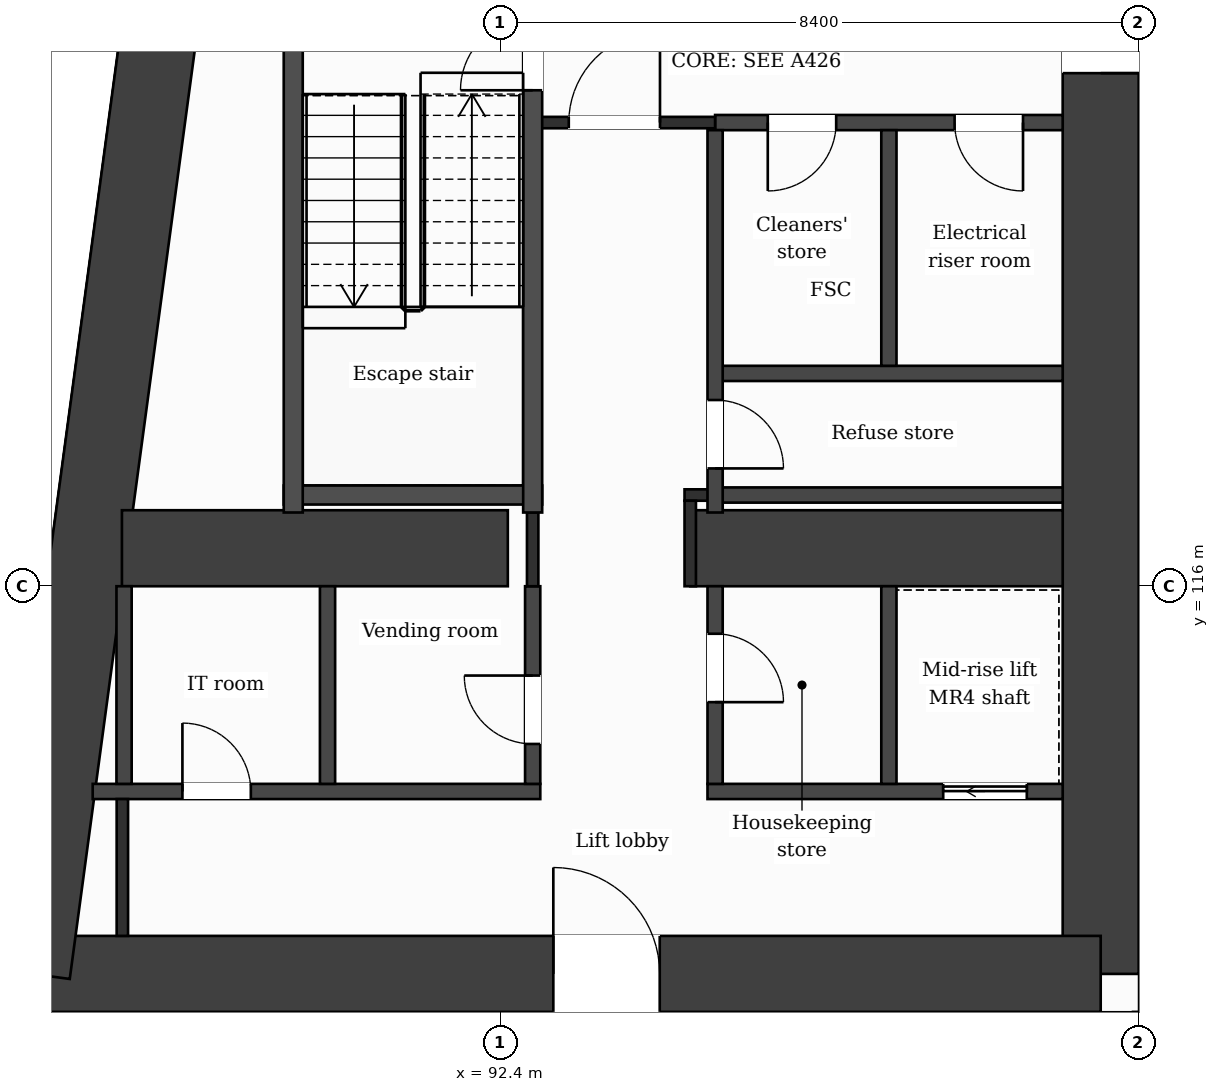
"""IFC4 building model, lengths in metres.
Left out: names, types, materials, properties, quantities, classifications, styles, units other than length and angle.
Written with IfcOpenShell. Run it as: python <this file> out.ifc"""

import sys

from ifc_helpers import new_model, si_unit, direction, frame, frame_2d, origin, place, context, subcontext, project, spatial, rectangle, extrude, element, fill, save


model = new_model("IFC4")
c1 = context("Model", 3, precision=1e-05, world=origin(), true_north=direction((0.0, 1.0)))
c2 = subcontext(c1, "Body", "Model", "MODEL_VIEW")
j1 = project(units=[si_unit("LENGTHUNIT", "METRE"), si_unit("PLANEANGLEUNIT", "RADIAN")], contexts=[c1])
p1 = place(None, origin())
s1 = spatial("IfcSite", under=j1, at=p1, CompositionType="ELEMENT")
p2 = place(p1, origin())
s2 = spatial("IfcBuilding", under=s1, at=p2, CompositionType="ELEMENT")
p3 = place(p2, frame((0.0, 0.0, 109.5)))
s3 = spatial("IfcBuildingStorey", under=s2, at=p3, CompositionType="ELEMENT", Elevation=109.5)
p4 = place(p3, frame((100.3, 131.9, 0.0), z_axis=(0.0, 0.0, 1.0), x_axis=(0.0, -1.0, 0.0)))
e1 = element("IfcWall", 1, at=p4, inside=s3, PredefinedType="SHEAR", context=c2, shape_type="SweptSolid", body=[
    extrude(rectangle(XDim=21.0, YDim=1.0, at=frame_2d((10.5, 0.0))), origin(), (0.0, 0.0, 1.0), 3.7),
])
p5 = place(p4, frame((7.75, 0.0, 0.0)))
e2 = element("IfcOpeningElement", 2, at=p5, cuts=e1, PredefinedType="OPENING", context=c2, shape_type="SweptSolid", body=[
    extrude(rectangle(XDim=1.4, YDim=2.1, at=frame_2d((0.7, 1.05))), frame((0.0, 0.51, 0.0), z_axis=(0.0, -1.0, 0.0), x_axis=(1.0, 0.0, 0.0)), (0.0, 0.0, 1.0), 1.02),
])
p6 = place(p3, frame((100.3, 110.9, 0.0), z_axis=(0.0, 0.0, 1.0), x_axis=(-1.0, 0.0, 0.0)))
e3 = element("IfcWall", 3, at=p6, inside=s3, PredefinedType="SHEAR", context=c2, shape_type="SweptSolid", body=[
    extrude(rectangle(XDim=14.059, YDim=1.0, at=frame_2d((7.03, 0.0))), origin(), (0.0, 0.0, 1.0), 3.7),
])
p7 = place(p6, frame((5.802, 0.0, 0.0)))
e4 = element("IfcOpeningElement", 4, at=p7, cuts=e3, PredefinedType="OPENING", context=c2, shape_type="SweptSolid", body=[
    extrude(rectangle(XDim=1.4, YDim=2.1, at=frame_2d((0.7, 1.05))), frame((0.0, 0.51, 0.0), z_axis=(0.0, -1.0, 0.0), x_axis=(1.0, 0.0, 0.0)), (0.0, 0.0, 1.0), 1.02),
])
p8 = place(p3, frame((86.241, 110.9, 0.0), z_axis=(0.0, 0.0, 1.0), x_axis=(0.133411141623, 0.991060778808, 0.0)))
e5 = element("IfcWall", 5, at=p8, inside=s3, PredefinedType="SHEAR", context=c2, shape_type="SweptSolid", body=[
    extrude(rectangle(XDim=21.189, YDim=1.0, at=frame_2d((10.595, 0.0))), origin(), (0.0, 0.0, 1.0), 3.7),
])
p9 = place(p3, frame((87.423, 116.5, 0.0), z_axis=(0.0, 0.0, 1.0), x_axis=(1.0, 0.0, 0.0)))
e6 = element("IfcWall", 6, at=p9, inside=s3, PredefinedType="SHEAR", context=c2, shape_type="SweptSolid", body=[
    extrude(rectangle(XDim=5.077, YDim=1.0, at=frame_2d((2.539, 0.0))), origin(), (0.0, 0.0, 1.0), 3.7),
])
p10 = place(p3, frame((94.9, 116.5, 0.0), z_axis=(0.0, 0.0, 1.0), x_axis=(1.0, 0.0, 0.0)))
e7 = element("IfcWall", 7, at=p10, inside=s3, PredefinedType="SHEAR", context=c2, shape_type="SweptSolid", body=[
    extrude(rectangle(XDim=4.9, YDim=1.0, at=frame_2d((2.45, 0.0))), origin(), (0.0, 0.0, 1.0), 3.7),
])
p11 = place(p3, frame((87.334, 110.4, 0.0), z_axis=(0.0, 0.0, 1.0), x_axis=(-0.133437175554, -0.991057273915, 0.0)))
e8 = element("IfcWall", 8, at=p11, inside=s3, PredefinedType="SOLIDWALL", context=c2, shape_type="SweptSolid", body=[
    extrude(rectangle(XDim=6.781, YDim=0.3, at=frame_2d((3.39, 0.0))), origin(), (0.0, 0.0, 1.0), 3.38),
])
p12 = place(p11, frame((1.418, 0.0, 0.0)))
e9 = element("IfcOpeningElement", 9, at=p12, cuts=e8, PredefinedType="OPENING", context=c2, shape_type="SweptSolid", body=[
    extrude(rectangle(XDim=1.2, YDim=2.4, at=frame_2d((0.6, 1.2))), frame((0.0, 0.16, 0.0), z_axis=(0.0, -1.0, 0.0), x_axis=(1.0, 0.0, 0.0)), (0.0, 0.0, 1.0), 0.32),
])
p13 = place(p11, frame((4.758, 0.0, 0.9)))
e10 = element("IfcOpeningElement", 10, at=p13, cuts=e8, PredefinedType="OPENING", context=c2, shape_type="SweptSolid", body=[
    extrude(rectangle(XDim=1.2, YDim=2.1, at=frame_2d((0.6, 1.05))), frame((0.0, 0.16, 0.0), z_axis=(0.0, -1.0, 0.0), x_axis=(1.0, 0.0, 0.0)), (0.0, 0.0, 1.0), 0.32),
])
p14 = place(p3, frame((87.039, 113.3, 0.0), z_axis=(0.0, 0.0, 1.0), x_axis=(1.0, 0.0, 0.0)))
e11 = element("IfcWall", 11, at=p14, inside=s3, PredefinedType="PARTITIONING", context=c2, shape_type="SweptSolid", body=[
    extrude(rectangle(XDim=5.888, YDim=0.2, at=frame_2d((2.944, 0.0))), origin(), (0.0, 0.0, 1.0), 3.38),
])
p15 = place(p14, frame((1.18, 0.0, 0.0)))
e12 = element("IfcOpeningElement", 12, at=p15, cuts=e11, PredefinedType="OPENING", context=c2, shape_type="SweptSolid", body=[
    extrude(rectangle(XDim=0.9, YDim=2.1, at=frame_2d((0.45, 1.05))), frame((0.0, 0.11, 0.0), z_axis=(0.0, -1.0, 0.0), x_axis=(1.0, 0.0, 0.0)), (0.0, 0.0, 1.0), 0.22),
])
p16 = place(p3, frame((95.127, 113.3, 0.0), z_axis=(0.0, 0.0, 1.0), x_axis=(1.0, 0.0, 0.0)))
e13 = element("IfcWall", 13, at=p16, inside=s3, PredefinedType="PARTITIONING", context=c2, shape_type="SweptSolid", body=[
    extrude(rectangle(XDim=4.673, YDim=0.2, at=frame_2d((2.336, 0.0))), origin(), (0.0, 0.0, 1.0), 3.38),
])
p17 = place(p16, frame((3.101, 0.0, 0.0)))
e14 = element("IfcOpeningElement", 14, at=p17, cuts=e13, PredefinedType="OPENING", context=c2, shape_type="SweptSolid", body=[
    extrude(rectangle(XDim=1.1, YDim=2.1, at=frame_2d((0.55, 1.05))), frame((0.0, 0.11, 0.0), z_axis=(0.0, -1.0, 0.0), x_axis=(1.0, 0.0, 0.0)), (0.0, 0.0, 1.0), 0.22),
])
p18 = place(p3, frame((95.227, 117.2, 0.0), z_axis=(0.0, 0.0, 1.0), x_axis=(1.0, 0.0, 0.0)))
e15 = element("IfcWall", 15, at=p18, inside=s3, PredefinedType="PARTITIONING", context=c2, shape_type="SweptSolid", body=[
    extrude(rectangle(XDim=4.573, YDim=0.2, at=frame_2d((2.287, 0.0))), origin(), (0.0, 0.0, 1.0), 3.38),
])
p19 = place(p3, frame((94.825, 117.2, 0.0), z_axis=(0.0, 0.0, 1.0), x_axis=(1.0, 0.0, 0.0)))
e16 = element("IfcWall", 16, at=p19, inside=s3, PredefinedType="PARTITIONING", context=c2, shape_type="SweptSolid", body=[
    extrude(rectangle(XDim=0.402, YDim=0.15, at=frame_2d((0.201, 0.0))), origin(), (0.0, 0.0, 1.0), 3.38),
])
p20 = place(p3, frame((89.552, 117.2, 0.0), z_axis=(0.0, 0.0, 1.0), x_axis=(1.0, 0.0, 0.0)))
e17 = element("IfcWall", 17, at=p20, inside=s3, PredefinedType="PARTITIONING", context=c2, shape_type="SweptSolid", body=[
    extrude(rectangle(XDim=3.4, YDim=0.25, at=frame_2d((1.7, 0.0))), origin(), (0.0, 0.0, 1.0), 3.38),
])
p21 = place(p3, frame((95.227, 118.8, 0.0), z_axis=(0.0, 0.0, 1.0), x_axis=(1.0, 0.0, 0.0)))
e18 = element("IfcWall", 18, at=p21, inside=s3, PredefinedType="PARTITIONING", context=c2, shape_type="SweptSolid", body=[
    extrude(rectangle(XDim=4.573, YDim=0.2, at=frame_2d((2.287, 0.0))), origin(), (0.0, 0.0, 1.0), 3.38),
])
p22 = place(p3, frame((95.227, 122.1, 0.0), z_axis=(0.0, 0.0, 1.0), x_axis=(1.0, 0.0, 0.0)))
e19 = element("IfcWall", 19, at=p22, inside=s3, PredefinedType="PARTITIONING", context=c2, shape_type="SweptSolid", body=[
    extrude(rectangle(XDim=4.573, YDim=0.2, at=frame_2d((2.287, 0.0))), origin(), (0.0, 0.0, 1.0), 3.38),
])
p23 = place(p22, frame((0.693, 0.0, 0.0)))
e20 = element("IfcOpeningElement", 20, at=p23, cuts=e19, PredefinedType="OPENING", context=c2, shape_type="SweptSolid", body=[
    extrude(rectangle(XDim=0.9, YDim=2.1, at=frame_2d((0.45, 1.05))), frame((0.0, 0.11, 0.0), z_axis=(0.0, -1.0, 0.0), x_axis=(1.0, 0.0, 0.0)), (0.0, 0.0, 1.0), 0.22),
])
p24 = place(p22, frame((3.151, 0.0, 0.0)))
e21 = element("IfcOpeningElement", 21, at=p24, cuts=e19, PredefinedType="OPENING", context=c2, shape_type="SweptSolid", body=[
    extrude(rectangle(XDim=0.9, YDim=2.1, at=frame_2d((0.45, 1.05))), frame((0.0, 0.11, 0.0), z_axis=(0.0, -1.0, 0.0), x_axis=(1.0, 0.0, 0.0)), (0.0, 0.0, 1.0), 0.22),
])
p25 = place(p3, frame((92.827, 122.1, 0.0), z_axis=(0.0, 0.0, 1.0), x_axis=(1.0, 0.0, 0.0)))
e22 = element("IfcWall", 22, at=p25, inside=s3, PredefinedType="PARTITIONING", context=c2, shape_type="SweptSolid", body=[
    extrude(rectangle(XDim=2.4, YDim=0.15, at=frame_2d((1.2, 0.0))), origin(), (0.0, 0.0, 1.0), 3.38),
])
p26 = place(p25, frame((0.475, 0.0, 0.0)))
e23 = element("IfcOpeningElement", 23, at=p26, cuts=e22, PredefinedType="OPENING", context=c2, shape_type="SweptSolid", body=[
    extrude(rectangle(XDim=1.2, YDim=2.1, at=frame_2d((0.6, 1.05))), frame((0.0, 0.085, 0.0), z_axis=(0.0, -1.0, 0.0), x_axis=(1.0, 0.0, 0.0)), (0.0, 0.0, 1.0), 0.17),
])
p27 = place(p3, frame((87.451, 113.4, 0.0), z_axis=(0.0, 0.0, 1.0), x_axis=(0.0, 1.0, 0.0)))
e24 = element("IfcWall", 24, at=p27, inside=s3, PredefinedType="PARTITIONING", context=c2, shape_type="SweptSolid", body=[
    extrude(rectangle(XDim=2.6, YDim=0.2, at=frame_2d((1.3, 0.0))), origin(), (0.0, 0.0, 1.0), 3.38),
])
p28 = place(p3, frame((87.429, 111.4, 0.0), z_axis=(0.0, 0.0, 1.0), x_axis=(0.0, 1.0, 0.0)))
e25 = element("IfcWall", 25, at=p28, inside=s3, PredefinedType="PARTITIONING", context=c2, shape_type="SweptSolid", body=[
    extrude(rectangle(XDim=1.8, YDim=0.15, at=frame_2d((0.9, 0.0))), origin(), (0.0, 0.0, 1.0), 3.38),
])
p29 = place(p3, frame((89.677, 116.97, 0.0), z_axis=(0.0, 0.0, 1.0), x_axis=(0.0, 1.0, 0.0)))
e26 = element("IfcWall", 26, at=p29, inside=s3, PredefinedType="PARTITIONING", context=c2, shape_type="SweptSolid", body=[
    extrude(rectangle(XDim=6.855, YDim=0.25, at=frame_2d((3.427, 0.0))), origin(), (0.0, 0.0, 1.0), 3.38),
])
p30 = place(p3, frame((90.128, 113.4, 0.0), z_axis=(0.0, 0.0, 1.0), x_axis=(0.0, 1.0, 0.0)))
e27 = element("IfcWall", 27, at=p30, inside=s3, PredefinedType="PARTITIONING", context=c2, shape_type="SweptSolid", body=[
    extrude(rectangle(XDim=2.6, YDim=0.2, at=frame_2d((1.3, 0.0))), origin(), (0.0, 0.0, 1.0), 3.38),
])
p31 = place(p3, frame((92.827, 113.4, 0.0), z_axis=(0.0, 0.0, 1.0), x_axis=(0.0, 1.0, 0.0)))
e28 = element("IfcWall", 28, at=p31, inside=s3, PredefinedType="PARTITIONING", context=c2, shape_type="SweptSolid", body=[
    extrude(rectangle(XDim=2.6, YDim=0.2, at=frame_2d((1.3, 0.0))), origin(), (0.0, 0.0, 1.0), 3.38),
])
p32 = place(p31, frame((0.525, 0.0, 0.0)))
e29 = element("IfcOpeningElement", 29, at=p32, cuts=e28, PredefinedType="OPENING", context=c2, shape_type="SweptSolid", body=[
    extrude(rectangle(XDim=0.9, YDim=2.1, at=frame_2d((0.45, 1.05))), frame((0.0, 0.11, 0.0), z_axis=(0.0, -1.0, 0.0), x_axis=(1.0, 0.0, 0.0)), (0.0, 0.0, 1.0), 0.22),
])
p33 = place(p3, frame((92.827, 116.0, 0.0), z_axis=(0.0, 0.0, 1.0), x_axis=(0.0, 1.0, 0.0)))
e30 = element("IfcWall", 30, at=p33, inside=s3, PredefinedType="PARTITIONING", context=c2, shape_type="SweptSolid", body=[
    extrude(rectangle(XDim=0.97, YDim=0.15, at=frame_2d((0.485, 0.0))), origin(), (0.0, 0.0, 1.0), 3.38),
])
p34 = place(p3, frame((92.827, 116.97, 0.0), z_axis=(0.0, 0.0, 1.0), x_axis=(0.0, 1.0, 0.0)))
e31 = element("IfcWall", 31, at=p34, inside=s3, PredefinedType="PARTITIONING", context=c2, shape_type="SweptSolid", body=[
    extrude(rectangle(XDim=6.855, YDim=0.25, at=frame_2d((3.427, 0.0))), origin(), (0.0, 0.0, 1.0), 3.38),
])
p35 = place(p34, frame((5.555, 0.0, 0.0)))
e32 = element("IfcOpeningElement", 32, at=p35, cuts=e31, PredefinedType="OPENING", context=c2, shape_type="SweptSolid", body=[
    extrude(rectangle(XDim=0.95, YDim=2.1, at=frame_2d((0.475, 1.05))), frame((0.0, 0.135, 0.0), z_axis=(0.0, -1.0, 0.0), x_axis=(1.0, 0.0, 0.0)), (0.0, 0.0, 1.0), 0.27),
])
p36 = place(p3, frame((94.9, 116.0, 0.0), z_axis=(0.0, 0.0, 1.0), x_axis=(0.0, 1.0, 0.0)))
e33 = element("IfcWall", 33, at=p36, inside=s3, PredefinedType="PARTITIONING", context=c2, shape_type="SweptSolid", body=[
    extrude(rectangle(XDim=1.125, YDim=0.15, at=frame_2d((0.562, 0.0))), origin(), (0.0, 0.0, 1.0), 3.38),
])
p37 = place(p3, frame((95.227, 113.4, 0.0), z_axis=(0.0, 0.0, 1.0), x_axis=(0.0, 1.0, 0.0)))
e34 = element("IfcWall", 34, at=p37, inside=s3, PredefinedType="PARTITIONING", context=c2, shape_type="SweptSolid", body=[
    extrude(rectangle(XDim=2.6, YDim=0.2, at=frame_2d((1.3, 0.0))), origin(), (0.0, 0.0, 1.0), 3.38),
])
p38 = place(p37, frame((1.075, 0.0, 0.0)))
e35 = element("IfcOpeningElement", 35, at=p38, cuts=e34, PredefinedType="OPENING", context=c2, shape_type="SweptSolid", body=[
    extrude(rectangle(XDim=0.9, YDim=2.1, at=frame_2d((0.45, 1.05))), frame((0.0, 0.11, 0.0), z_axis=(0.0, -1.0, 0.0), x_axis=(1.0, 0.0, 0.0)), (0.0, 0.0, 1.0), 0.22),
])
p39 = place(p3, frame((95.227, 116.97, 0.0), z_axis=(0.0, 0.0, 1.0), x_axis=(0.0, 1.0, 0.0)))
e36 = element("IfcWall", 36, at=p39, inside=s3, PredefinedType="PARTITIONING", context=c2, shape_type="SweptSolid", body=[
    extrude(rectangle(XDim=5.03, YDim=0.2, at=frame_2d((2.515, 0.0))), origin(), (0.0, 0.0, 1.0), 3.38),
])
p40 = place(p39, frame((0.58, 0.0, 0.0)))
e37 = element("IfcOpeningElement", 37, at=p40, cuts=e36, PredefinedType="OPENING", context=c2, shape_type="SweptSolid", body=[
    extrude(rectangle(XDim=0.9, YDim=2.1, at=frame_2d((0.45, 1.05))), frame((0.0, 0.11, 0.0), z_axis=(0.0, -1.0, 0.0), x_axis=(1.0, 0.0, 0.0)), (0.0, 0.0, 1.0), 0.22),
])
p41 = place(p3, frame((97.513, 113.4, 0.0), z_axis=(0.0, 0.0, 1.0), x_axis=(0.0, 1.0, 0.0)))
e38 = element("IfcWall", 38, at=p41, inside=s3, PredefinedType="PARTITIONING", context=c2, shape_type="SweptSolid", body=[
    extrude(rectangle(XDim=2.6, YDim=0.2, at=frame_2d((1.3, 0.0))), origin(), (0.0, 0.0, 1.0), 3.38),
])
p42 = place(p3, frame((97.513, 118.9, 0.0), z_axis=(0.0, 0.0, 1.0), x_axis=(0.0, 1.0, 0.0)))
e39 = element("IfcWall", 39, at=p42, inside=s3, PredefinedType="PARTITIONING", context=c2, shape_type="SweptSolid", body=[
    extrude(rectangle(XDim=3.1, YDim=0.2, at=frame_2d((1.55, 0.0))), origin(), (0.0, 0.0, 1.0), 3.38),
])
p43 = place(p3, frame((100.8, 109.075, 0.0), z_axis=(0.0, 0.0, 1.0), x_axis=(0.0, 1.0, 0.0)))
e40 = element("IfcWall", 40, at=p43, inside=s3, PredefinedType="PARTITIONING", context=c2, shape_type="SweptSolid", body=[
    extrude(rectangle(XDim=1.325, YDim=0.15, at=frame_2d((0.663, 0.0))), origin(), (0.0, 0.0, 1.0), 3.38),
])
p44 = place(p26, origin())
e41 = element("IfcDoor", 41, at=p44, inside=s3, OperationType="SINGLE_SWING_RIGHT", PredefinedType="DOOR", context=c2, shape_type="SweptSolid", body=[
    extrude(rectangle(XDim=1.2, YDim=2.1, at=frame_2d((0.6, 1.05))), frame((0.0, 0.025, 0.0), z_axis=(0.0, -1.0, 0.0), x_axis=(1.0, 0.0, 0.0)), (0.0, 0.0, 1.0), 0.05),
])
fill(e23, e41)
p45 = place(p23, origin())
e42 = element("IfcDoor", 42, at=p45, inside=s3, OperationType="SINGLE_SWING_LEFT", PredefinedType="DOOR", context=c2, shape_type="SweptSolid", body=[
    extrude(rectangle(XDim=0.9, YDim=2.1, at=frame_2d((0.45, 1.05))), frame((0.0, 0.025, 0.0), z_axis=(0.0, -1.0, 0.0), x_axis=(1.0, 0.0, 0.0)), (0.0, 0.0, 1.0), 0.05),
])
fill(e20, e42)
p46 = place(p24, origin())
e43 = element("IfcDoor", 43, at=p46, inside=s3, OperationType="SINGLE_SWING_RIGHT", PredefinedType="DOOR", context=c2, shape_type="SweptSolid", body=[
    extrude(rectangle(XDim=0.9, YDim=2.1, at=frame_2d((0.45, 1.05))), frame((0.0, 0.025, 0.0), z_axis=(0.0, -1.0, 0.0), x_axis=(1.0, 0.0, 0.0)), (0.0, 0.0, 1.0), 0.05),
])
fill(e21, e43)
p47 = place(p35, origin())
e44 = element("IfcDoor", 44, at=p47, inside=s3, OperationType="SINGLE_SWING_LEFT", PredefinedType="DOOR", context=c2, shape_type="SweptSolid", body=[
    extrude(rectangle(XDim=0.95, YDim=2.1, at=frame_2d((0.475, 1.05))), frame((0.0, 0.025, 0.0), z_axis=(0.0, -1.0, 0.0), x_axis=(1.0, 0.0, 0.0)), (0.0, 0.0, 1.0), 0.05),
])
fill(e32, e44)
p48 = place(p40, origin())
e45 = element("IfcDoor", 45, at=p48, inside=s3, OperationType="SINGLE_SWING_LEFT", PredefinedType="DOOR", context=c2, shape_type="SweptSolid", body=[
    extrude(rectangle(XDim=0.9, YDim=2.1, at=frame_2d((0.45, 1.05))), frame((0.0, 0.025, 0.0), z_axis=(0.0, -1.0, 0.0), x_axis=(1.0, 0.0, 0.0)), (0.0, 0.0, 1.0), 0.05),
])
fill(e37, e45)
p49 = place(p17, origin())
e46 = element("IfcDoor", 46, at=p49, inside=s3, OperationType="SLIDING_TO_LEFT", PredefinedType="DOOR", context=c2, shape_type="SweptSolid", body=[
    extrude(rectangle(XDim=1.1, YDim=2.1, at=frame_2d((0.55, 1.05))), frame((0.0, 0.025, 0.0), z_axis=(0.0, -1.0, 0.0), x_axis=(1.0, 0.0, 0.0)), (0.0, 0.0, 1.0), 0.05),
])
fill(e14, e46)
p50 = place(p15, origin())
e47 = element("IfcDoor", 47, at=p50, inside=s3, OperationType="SINGLE_SWING_LEFT", PredefinedType="DOOR", context=c2, shape_type="SweptSolid", body=[
    extrude(rectangle(XDim=0.9, YDim=2.1, at=frame_2d((0.45, 1.05))), frame((0.0, 0.025, 0.0), z_axis=(0.0, -1.0, 0.0), x_axis=(1.0, 0.0, 0.0)), (0.0, 0.0, 1.0), 0.05),
])
fill(e12, e47)
p51 = place(p32, origin())
e48 = element("IfcDoor", 48, at=p51, inside=s3, OperationType="SINGLE_SWING_RIGHT", PredefinedType="DOOR", context=c2, shape_type="SweptSolid", body=[
    extrude(rectangle(XDim=0.9, YDim=2.1, at=frame_2d((0.45, 1.05))), frame((0.0, 0.025, 0.0), z_axis=(0.0, -1.0, 0.0), x_axis=(1.0, 0.0, 0.0)), (0.0, 0.0, 1.0), 0.05),
])
fill(e29, e48)
p52 = place(p38, origin())
e49 = element("IfcDoor", 49, at=p52, inside=s3, OperationType="SINGLE_SWING_LEFT", PredefinedType="DOOR", context=c2, shape_type="SweptSolid", body=[
    extrude(rectangle(XDim=0.9, YDim=2.1, at=frame_2d((0.45, 1.05))), frame((0.0, 0.025, 0.0), z_axis=(0.0, -1.0, 0.0), x_axis=(1.0, 0.0, 0.0)), (0.0, 0.0, 1.0), 0.05),
])
fill(e35, e49)
p53 = place(p7, origin())
e50 = element("IfcDoor", 50, at=p53, inside=s3, OperationType="SINGLE_SWING_RIGHT", PredefinedType="DOOR", context=c2, shape_type="SweptSolid", body=[
    extrude(rectangle(XDim=1.4, YDim=2.1, at=frame_2d((0.7, 1.05))), frame((0.0, 0.025, 0.0), z_axis=(0.0, -1.0, 0.0), x_axis=(1.0, 0.0, 0.0)), (0.0, 0.0, 1.0), 0.05),
])
fill(e4, e50)
p54 = place(p5, origin())
e51 = element("IfcDoor", 51, at=p54, inside=s3, OperationType="SINGLE_SWING_RIGHT", PredefinedType="DOOR", context=c2, shape_type="SweptSolid", body=[
    extrude(rectangle(XDim=1.4, YDim=2.1, at=frame_2d((0.7, 1.05))), frame((0.0, 0.025, 0.0), z_axis=(0.0, -1.0, 0.0), x_axis=(1.0, 0.0, 0.0)), (0.0, 0.0, 1.0), 0.05),
])
fill(e2, e51)
save(model, sys.argv[1])
